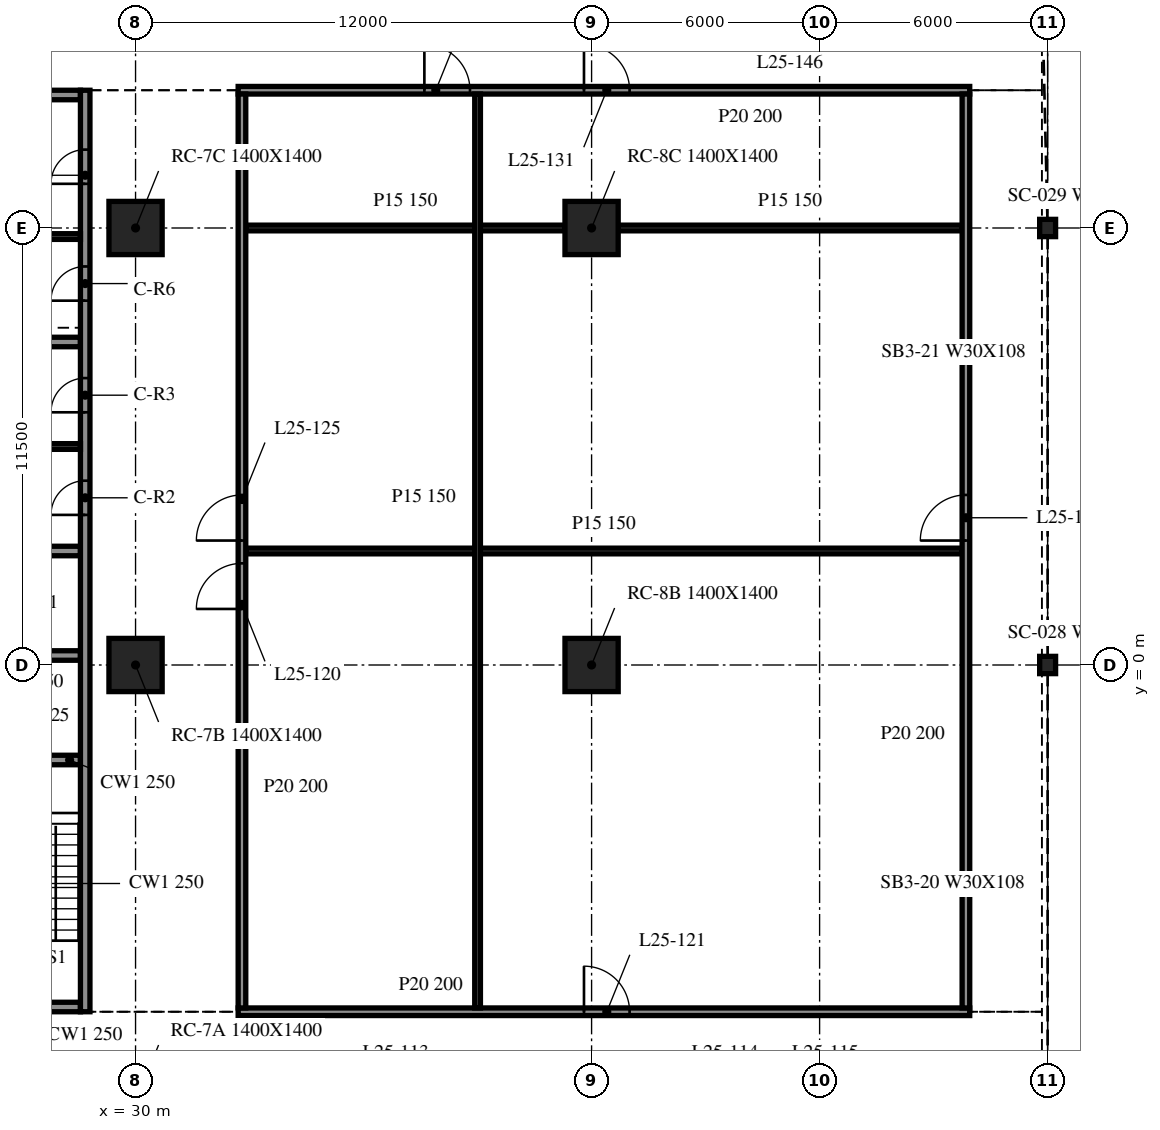
"""IFC4 building model, lengths in metres.
Left out: names, types, materials, properties, quantities, classifications, styles, units other than length and angle.
Written with IfcOpenShell. Run it as: python <this file> out.ifc"""

import sys

from ifc_helpers import new_model, si_unit, direction, frame, frame_2d, origin, origin_2d, place, context, subcontext, project, spatial, rectangle, i_section, extrude, element, fill, save


model = new_model("IFC4")
c1 = context("Model", 3, precision=1e-05, world=origin(), true_north=direction((0.0, 1.0)))
c2 = subcontext(c1, "Body", "Model", "MODEL_VIEW")
j1 = project(units=[si_unit("LENGTHUNIT", "METRE"), si_unit("PLANEANGLEUNIT", "RADIAN")], contexts=[c1])
p1 = place(None, origin())
s1 = spatial("IfcSite", under=j1, at=p1, CompositionType="ELEMENT")
p2 = place(p1, origin())
s2 = spatial("IfcBuilding", under=s1, at=p2, CompositionType="ELEMENT")
p3 = place(p2, frame((0.0, 0.0, 109.4)))
s3 = spatial("IfcBuildingStorey", under=s2, at=p3, CompositionType="ELEMENT", Elevation=109.4)
for number, where, z_axis, x_axis in (
    (1, (30.0, 0.0, -0.34), (0.0, 0.0, 1.0), (1.0, 0.0, 0.0)),
    (2, (30.0, 11.5, -0.34), (0.0, 0.0, 1.0), (1.0, 0.0, 0.0)),
    (3, (42.0, 0.0, -0.34), (0.0, 0.0, 1.0), (1.0, 0.0, 0.0)),
    (4, (42.0, 11.5, -0.34), (0.0, 0.0, 1.0), (1.0, 0.0, 0.0)),
):
    element("IfcColumn", number, at=place(p3, frame(where, z_axis=z_axis, x_axis=x_axis)), inside=s3, PredefinedType="COLUMN", context=c2, shape_type="SweptSolid", body=[
        extrude(rectangle(XDim=1.4, YDim=1.4, at=origin_2d()), origin(), (0.0, 0.0, 1.0), 4.1),
    ])
for number, where, z_axis, x_axis in (
    (5, (54.0, 0.0, -0.34), (0.0, 0.0, 1.0), (1.0, 0.0, 0.0)),
    (6, (54.0, 11.5, -0.34), (0.0, 0.0, 1.0), (1.0, 0.0, 0.0)),
):
    element("IfcColumn", number, at=place(p3, frame(where, z_axis=z_axis, x_axis=x_axis)), inside=s3, PredefinedType="COLUMN", context=c2, shape_type="SweptSolid", body=[
        extrude(i_section(OverallWidth=0.419, OverallDepth=0.455, WebThickness=0.042, FlangeThickness=0.068, at=origin_2d()), origin(), (0.0, 0.0, 1.0), 4.1),
    ])
p4 = place(p3, frame((28.675, -9.125, 0.0), z_axis=(0.0, 0.0, 1.0), x_axis=(0.0, 1.0, 0.0)))
e7 = element("IfcWall", 7, at=p4, inside=s3, PredefinedType="SOLIDWALL", context=c2, shape_type="SweptSolid", body=[
    extrude(rectangle(XDim=24.25, YDim=0.25, at=frame_2d((12.125, 0.0))), origin(), (0.0, 0.0, 1.0), 3.76),
])
p5 = place(p4, frame((13.075, 0.0, 0.0)))
e8 = element("IfcOpeningElement", 8, at=p5, cuts=e7, PredefinedType="OPENING", context=c2, shape_type="SweptSolid", body=[
    extrude(rectangle(XDim=0.9, YDim=2.1, at=frame_2d((0.45, 1.05))), frame((0.0, 0.135, 0.0), z_axis=(0.0, -1.0, 0.0), x_axis=(1.0, 0.0, 0.0)), (0.0, 0.0, 1.0), 0.27),
])
p6 = place(p4, frame((15.775, 0.0, 0.0)))
e9 = element("IfcOpeningElement", 9, at=p6, cuts=e7, PredefinedType="OPENING", context=c2, shape_type="SweptSolid", body=[
    extrude(rectangle(XDim=0.9, YDim=2.1, at=frame_2d((0.45, 1.05))), frame((0.0, 0.135, 0.0), z_axis=(0.0, -1.0, 0.0), x_axis=(1.0, 0.0, 0.0)), (0.0, 0.0, 1.0), 0.27),
])
p7 = place(p4, frame((18.712, 0.0, 0.0)))
e10 = element("IfcOpeningElement", 10, at=p7, cuts=e7, PredefinedType="OPENING", context=c2, shape_type="SweptSolid", body=[
    extrude(rectangle(XDim=0.9, YDim=2.1, at=frame_2d((0.45, 1.05))), frame((0.0, 0.135, 0.0), z_axis=(0.0, -1.0, 0.0), x_axis=(1.0, 0.0, 0.0)), (0.0, 0.0, 1.0), 0.27),
])
p8 = place(p4, frame((21.788, 0.0, 0.0)))
e11 = element("IfcOpeningElement", 11, at=p8, cuts=e7, PredefinedType="OPENING", context=c2, shape_type="SweptSolid", body=[
    extrude(rectangle(XDim=0.9, YDim=2.1, at=frame_2d((0.45, 1.05))), frame((0.0, 0.135, 0.0), z_axis=(0.0, -1.0, 0.0), x_axis=(1.0, 0.0, 0.0)), (0.0, 0.0, 1.0), 0.27),
])
p9 = place(p3, frame((28.55, -9.0, 0.0), z_axis=(0.0, 0.0, 1.0), x_axis=(-1.0, 0.0, 0.0)))
e12 = element("IfcWall", 12, at=p9, inside=s3, PredefinedType="SOLIDWALL", context=c2, shape_type="SweptSolid", body=[
    extrude(rectangle(XDim=9.1, YDim=0.25, at=frame_2d((4.55, 0.0))), origin(), (0.0, 0.0, 1.0), 3.76),
])
p10 = place(p9, frame((3.65, 0.0, 0.0)))
e13 = element("IfcOpeningElement", 13, at=p10, cuts=e12, PredefinedType="OPENING", context=c2, shape_type="SweptSolid", body=[
    extrude(rectangle(XDim=1.8, YDim=2.1, at=frame_2d((0.9, 1.05))), frame((0.0, 0.135, 0.0), z_axis=(0.0, -1.0, 0.0), x_axis=(1.0, 0.0, 0.0)), (0.0, 0.0, 1.0), 0.27),
])
p11 = place(p3, frame((19.45, 15.0, 0.0), z_axis=(0.0, 0.0, 1.0), x_axis=(1.0, 0.0, 0.0)))
e14 = element("IfcWall", 14, at=p11, inside=s3, PredefinedType="SOLIDWALL", context=c2, shape_type="SweptSolid", body=[
    extrude(rectangle(XDim=9.1, YDim=0.25, at=frame_2d((4.55, 0.0))), origin(), (0.0, 0.0, 1.0), 3.76),
])
p12 = place(p11, frame((3.65, 0.0, 0.0)))
e15 = element("IfcOpeningElement", 15, at=p12, cuts=e14, PredefinedType="OPENING", context=c2, shape_type="SweptSolid", body=[
    extrude(rectangle(XDim=1.8, YDim=2.1, at=frame_2d((0.9, 1.05))), frame((0.0, 0.135, 0.0), z_axis=(0.0, -1.0, 0.0), x_axis=(1.0, 0.0, 0.0)), (0.0, 0.0, 1.0), 0.27),
])
for number, where, z_axis, x_axis in (
    (16, (25.7, -2.5, 0.0), (0.0, 0.0, 1.0), (1.0, 0.0, 0.0)),
    (17, (25.7, 0.25, 0.0), (0.0, 0.0, 1.0), (1.0, 0.0, 0.0)),
    (18, (25.7, 3.0, 0.0), (0.0, 0.0, 1.0), (1.0, 0.0, 0.0)),
    (19, (25.7, 8.5, 0.0), (0.0, 0.0, 1.0), (1.0, 0.0, 0.0)),
):
    element("IfcWall", number, at=place(p3, frame(where, z_axis=z_axis, x_axis=x_axis)), inside=s3, PredefinedType="SOLIDWALL", context=c2, shape_type="SweptSolid", body=[
        extrude(rectangle(XDim=2.85, YDim=0.25, at=frame_2d((1.425, 0.0))), origin(), (0.0, 0.0, 1.0), 3.76),
    ])
for number, where, z_axis, x_axis in (
    (20, (25.7, 5.75, 0.0), (0.0, 0.0, 1.0), (1.0, 0.0, 0.0)),
    (21, (25.7, 11.275, 0.0), (0.0, 0.0, 1.0), (1.0, 0.0, 0.0)),
):
    element("IfcWall", number, at=place(p3, frame(where, z_axis=z_axis, x_axis=x_axis)), inside=s3, PredefinedType="PARTITIONING", context=c2, shape_type="SweptSolid", body=[
        extrude(rectangle(XDim=2.85, YDim=0.15, at=frame_2d((1.425, 0.0))), origin(), (0.0, 0.0, 1.0), 3.76),
    ])
p13 = place(p3, frame((32.7, -9.125, 0.0), z_axis=(0.0, 0.0, 1.0), x_axis=(1.0, 0.0, 0.0)))
e22 = element("IfcWall", 22, at=p13, inside=s3, PredefinedType="PARTITIONING", context=c2, shape_type="SweptSolid", body=[
    extrude(rectangle(XDim=19.25, YDim=0.2, at=frame_2d((9.625, 0.0))), origin(), (0.0, 0.0, 1.0), 3.76),
])
p14 = place(p13, frame((9.1, 0.0, 0.0)))
e23 = element("IfcOpeningElement", 23, at=p14, cuts=e22, PredefinedType="OPENING", context=c2, shape_type="SweptSolid", body=[
    extrude(rectangle(XDim=1.2, YDim=2.1, at=frame_2d((0.6, 1.05))), frame((0.0, 0.11, 0.0), z_axis=(0.0, -1.0, 0.0), x_axis=(1.0, 0.0, 0.0)), (0.0, 0.0, 1.0), 0.22),
])
p15 = place(p3, frame((32.9, 3.0, 0.0), z_axis=(0.0, 0.0, 1.0), x_axis=(1.0, 0.0, 0.0)))
e24 = element("IfcWall", 24, at=p15, inside=s3, PredefinedType="PARTITIONING", context=c2, shape_type="SweptSolid", body=[
    extrude(rectangle(XDim=18.85, YDim=0.15, at=frame_2d((9.425, 0.0))), origin(), (0.0, 0.0, 1.0), 3.76),
])
p16 = place(p3, frame((32.9, 11.5, 0.0), z_axis=(0.0, 0.0, 1.0), x_axis=(1.0, 0.0, 0.0)))
e25 = element("IfcWall", 25, at=p16, inside=s3, PredefinedType="PARTITIONING", context=c2, shape_type="SweptSolid", body=[
    extrude(rectangle(XDim=8.4, YDim=0.15, at=frame_2d((4.2, 0.0))), origin(), (0.0, 0.0, 1.0), 3.76),
])
p17 = place(p3, frame((42.7, 11.5, 0.0), z_axis=(0.0, 0.0, 1.0), x_axis=(1.0, 0.0, 0.0)))
e26 = element("IfcWall", 26, at=p17, inside=s3, PredefinedType="PARTITIONING", context=c2, shape_type="SweptSolid", body=[
    extrude(rectangle(XDim=9.05, YDim=0.15, at=frame_2d((4.525, 0.0))), origin(), (0.0, 0.0, 1.0), 3.76),
])
p18 = place(p3, frame((32.7, 15.125, 0.0), z_axis=(0.0, 0.0, 1.0), x_axis=(1.0, 0.0, 0.0)))
e27 = element("IfcWall", 27, at=p18, inside=s3, PredefinedType="PARTITIONING", context=c2, shape_type="SweptSolid", body=[
    extrude(rectangle(XDim=19.25, YDim=0.2, at=frame_2d((9.625, 0.0))), origin(), (0.0, 0.0, 1.0), 3.76),
])
p19 = place(p18, frame((4.9, 0.0, 0.0)))
e28 = element("IfcOpeningElement", 28, at=p19, cuts=e27, PredefinedType="OPENING", context=c2, shape_type="SweptSolid", body=[
    extrude(rectangle(XDim=1.2, YDim=2.1, at=frame_2d((0.6, 1.05))), frame((0.0, 0.11, 0.0), z_axis=(0.0, -1.0, 0.0), x_axis=(1.0, 0.0, 0.0)), (0.0, 0.0, 1.0), 0.22),
])
p20 = place(p18, frame((9.1, 0.0, 0.0)))
e29 = element("IfcOpeningElement", 29, at=p20, cuts=e27, PredefinedType="OPENING", context=c2, shape_type="SweptSolid", body=[
    extrude(rectangle(XDim=1.2, YDim=2.1, at=frame_2d((0.6, 1.05))), frame((0.0, 0.11, 0.0), z_axis=(0.0, -1.0, 0.0), x_axis=(1.0, 0.0, 0.0)), (0.0, 0.0, 1.0), 0.22),
])
p21 = place(p3, frame((32.8, -9.025, 0.0), z_axis=(0.0, 0.0, 1.0), x_axis=(0.0, 1.0, 0.0)))
e30 = element("IfcWall", 30, at=p21, inside=s3, PredefinedType="PARTITIONING", context=c2, shape_type="SweptSolid", body=[
    extrude(rectangle(XDim=24.05, YDim=0.2, at=frame_2d((12.025, 0.0))), origin(), (0.0, 0.0, 1.0), 3.76),
])
p22 = place(p21, frame((10.5, 0.0, 0.0)))
e31 = element("IfcOpeningElement", 31, at=p22, cuts=e30, PredefinedType="OPENING", context=c2, shape_type="SweptSolid", body=[
    extrude(rectangle(XDim=1.2, YDim=2.1, at=frame_2d((0.6, 1.05))), frame((0.0, 0.11, 0.0), z_axis=(0.0, -1.0, 0.0), x_axis=(1.0, 0.0, 0.0)), (0.0, 0.0, 1.0), 0.22),
])
p23 = place(p21, frame((12.3, 0.0, 0.0)))
e32 = element("IfcOpeningElement", 32, at=p23, cuts=e30, PredefinedType="OPENING", context=c2, shape_type="SweptSolid", body=[
    extrude(rectangle(XDim=1.2, YDim=2.1, at=frame_2d((0.6, 1.05))), frame((0.0, 0.11, 0.0), z_axis=(0.0, -1.0, 0.0), x_axis=(1.0, 0.0, 0.0)), (0.0, 0.0, 1.0), 0.22),
])
p24 = place(p3, frame((39.0, -9.025, 0.0), z_axis=(0.0, 0.0, 1.0), x_axis=(0.0, 1.0, 0.0)))
e33 = element("IfcWall", 33, at=p24, inside=s3, PredefinedType="PARTITIONING", context=c2, shape_type="SweptSolid", body=[
    extrude(rectangle(XDim=24.05, YDim=0.15, at=frame_2d((12.025, 0.0))), origin(), (0.0, 0.0, 1.0), 3.76),
])
p25 = place(p3, frame((51.85, -9.025, 0.0), z_axis=(0.0, 0.0, 1.0), x_axis=(0.0, 1.0, 0.0)))
e34 = element("IfcWall", 34, at=p25, inside=s3, PredefinedType="PARTITIONING", context=c2, shape_type="SweptSolid", body=[
    extrude(rectangle(XDim=24.05, YDim=0.2, at=frame_2d((12.025, 0.0))), origin(), (0.0, 0.0, 1.0), 3.76),
])
p26 = place(p25, frame((12.3, 0.0, 0.0)))
e35 = element("IfcOpeningElement", 35, at=p26, cuts=e34, PredefinedType="OPENING", context=c2, shape_type="SweptSolid", body=[
    extrude(rectangle(XDim=1.2, YDim=2.1, at=frame_2d((0.6, 1.05))), frame((0.0, 0.11, 0.0), z_axis=(0.0, -1.0, 0.0), x_axis=(1.0, 0.0, 0.0)), (0.0, 0.0, 1.0), 0.22),
])
p27 = place(p5, origin())
e36 = element("IfcDoor", 36, at=p27, inside=s3, OperationType="SINGLE_SWING_RIGHT", PredefinedType="DOOR", context=c2, shape_type="SweptSolid", body=[
    extrude(rectangle(XDim=0.9, YDim=2.1, at=frame_2d((0.45, 1.05))), frame((0.0, 0.025, 0.0), z_axis=(0.0, -1.0, 0.0), x_axis=(1.0, 0.0, 0.0)), (0.0, 0.0, 1.0), 0.05),
])
fill(e8, e36)
p28 = place(p6, origin())
e37 = element("IfcDoor", 37, at=p28, inside=s3, OperationType="SINGLE_SWING_LEFT", PredefinedType="DOOR", context=c2, shape_type="SweptSolid", body=[
    extrude(rectangle(XDim=0.9, YDim=2.1, at=frame_2d((0.45, 1.05))), frame((0.0, 0.025, 0.0), z_axis=(0.0, -1.0, 0.0), x_axis=(1.0, 0.0, 0.0)), (0.0, 0.0, 1.0), 0.05),
])
fill(e9, e37)
p29 = place(p7, origin())
e38 = element("IfcDoor", 38, at=p29, inside=s3, OperationType="SINGLE_SWING_RIGHT", PredefinedType="DOOR", context=c2, shape_type="SweptSolid", body=[
    extrude(rectangle(XDim=0.9, YDim=2.1, at=frame_2d((0.45, 1.05))), frame((0.0, 0.025, 0.0), z_axis=(0.0, -1.0, 0.0), x_axis=(1.0, 0.0, 0.0)), (0.0, 0.0, 1.0), 0.05),
])
fill(e10, e38)
p30 = place(p8, origin())
e39 = element("IfcDoor", 39, at=p30, inside=s3, OperationType="SINGLE_SWING_LEFT", PredefinedType="DOOR", context=c2, shape_type="SweptSolid", body=[
    extrude(rectangle(XDim=0.9, YDim=2.1, at=frame_2d((0.45, 1.05))), frame((0.0, 0.025, 0.0), z_axis=(0.0, -1.0, 0.0), x_axis=(1.0, 0.0, 0.0)), (0.0, 0.0, 1.0), 0.05),
])
fill(e11, e39)
p31 = place(p22, origin())
e40 = element("IfcDoor", 40, at=p31, inside=s3, OperationType="SINGLE_SWING_RIGHT", PredefinedType="DOOR", context=c2, shape_type="SweptSolid", body=[
    extrude(rectangle(XDim=1.2, YDim=2.1, at=frame_2d((0.6, 1.05))), frame((0.0, 0.025, 0.0), z_axis=(0.0, -1.0, 0.0), x_axis=(1.0, 0.0, 0.0)), (0.0, 0.0, 1.0), 0.05),
])
fill(e31, e40)
p32 = place(p14, origin())
e41 = element("IfcDoor", 41, at=p32, inside=s3, OperationType="SINGLE_SWING_RIGHT", PredefinedType="DOOR", context=c2, shape_type="SweptSolid", body=[
    extrude(rectangle(XDim=1.2, YDim=2.1, at=frame_2d((0.6, 1.05))), frame((0.0, 0.025, 0.0), z_axis=(0.0, -1.0, 0.0), x_axis=(1.0, 0.0, 0.0)), (0.0, 0.0, 1.0), 0.05),
])
fill(e23, e41)
p33 = place(p23, origin())
e42 = element("IfcDoor", 42, at=p33, inside=s3, OperationType="SINGLE_SWING_LEFT", PredefinedType="DOOR", context=c2, shape_type="SweptSolid", body=[
    extrude(rectangle(XDim=1.2, YDim=2.1, at=frame_2d((0.6, 1.05))), frame((0.0, 0.025, 0.0), z_axis=(0.0, -1.0, 0.0), x_axis=(1.0, 0.0, 0.0)), (0.0, 0.0, 1.0), 0.05),
])
fill(e32, e42)
p34 = place(p26, origin())
e43 = element("IfcDoor", 43, at=p34, inside=s3, OperationType="SINGLE_SWING_RIGHT", PredefinedType="DOOR", context=c2, shape_type="SweptSolid", body=[
    extrude(rectangle(XDim=1.2, YDim=2.1, at=frame_2d((0.6, 1.05))), frame((0.0, 0.025, 0.0), z_axis=(0.0, -1.0, 0.0), x_axis=(1.0, 0.0, 0.0)), (0.0, 0.0, 1.0), 0.05),
])
fill(e35, e43)
p35 = place(p19, origin())
e44 = element("IfcDoor", 44, at=p35, inside=s3, OperationType="SINGLE_SWING_RIGHT", PredefinedType="DOOR", context=c2, shape_type="SweptSolid", body=[
    extrude(rectangle(XDim=1.2, YDim=2.1, at=frame_2d((0.6, 1.05))), frame((0.0, 0.025, 0.0), z_axis=(0.0, -1.0, 0.0), x_axis=(1.0, 0.0, 0.0)), (0.0, 0.0, 1.0), 0.05),
])
fill(e28, e44)
p36 = place(p20, origin())
e45 = element("IfcDoor", 45, at=p36, inside=s3, OperationType="SINGLE_SWING_LEFT", PredefinedType="DOOR", context=c2, shape_type="SweptSolid", body=[
    extrude(rectangle(XDim=1.2, YDim=2.1, at=frame_2d((0.6, 1.05))), frame((0.0, 0.025, 0.0), z_axis=(0.0, -1.0, 0.0), x_axis=(1.0, 0.0, 0.0)), (0.0, 0.0, 1.0), 0.05),
])
fill(e29, e45)
save(model, sys.argv[1])
